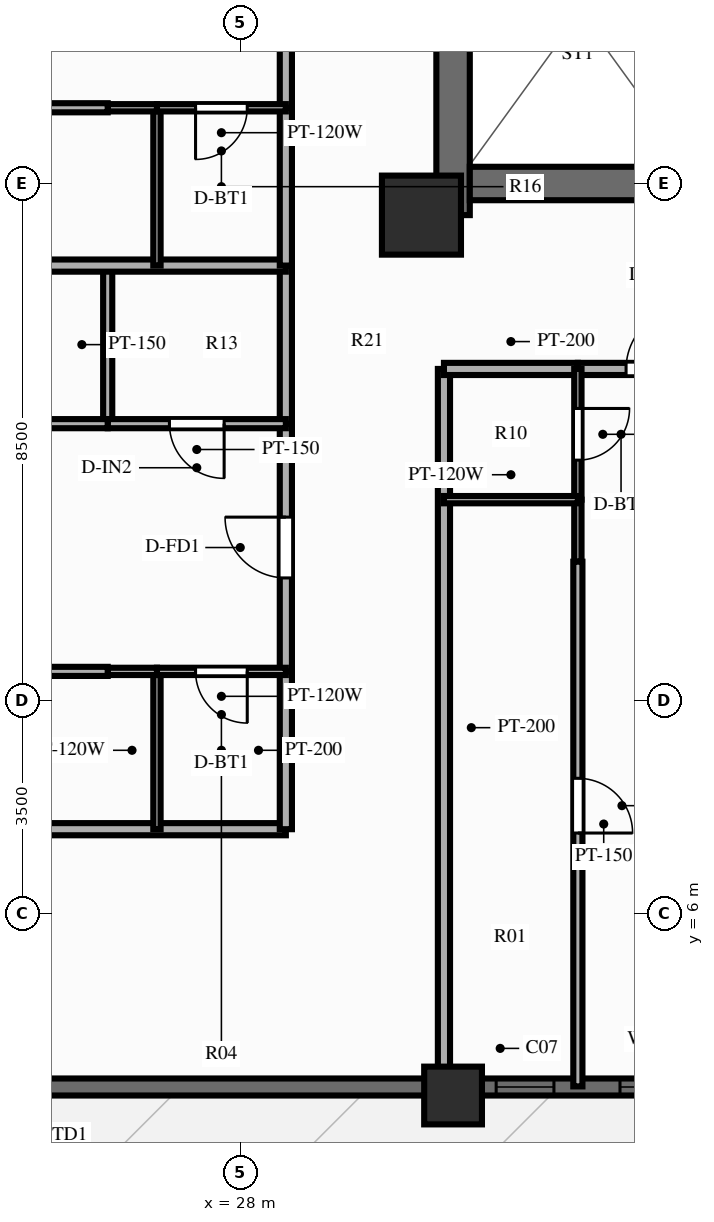
"""IFC4 building model, lengths in metres.
Left out: names, types, materials, properties, quantities, classifications, styles, units other than length and angle.
Written with IfcOpenShell. Run it as: python <this file> out.ifc"""

import sys

from ifc_helpers import new_model, si_unit, direction, frame, frame_2d, origin, origin_2d, place, context, subcontext, project, spatial, rectangle, extrude, source, transform, mapped, element, fill, save


model = new_model("IFC4")
c1 = context("Model", 3, precision=1e-05, world=origin(), true_north=direction((0.0, 1.0)))
c2 = subcontext(c1, "Body", "Model", "MODEL_VIEW")
j1 = project(units=[si_unit("LENGTHUNIT", "METRE"), si_unit("PLANEANGLEUNIT", "RADIAN")], contexts=[c1])
p1 = place(None, origin())
s1 = spatial("IfcSite", under=j1, at=p1, CompositionType="ELEMENT")
p2 = place(p1, origin())
s2 = spatial("IfcBuilding", under=s1, at=p2, CompositionType="ELEMENT")
p3 = place(p2, frame((0.0, 0.0, 110.85)))
s3 = spatial("IfcBuildingStorey", under=s2, at=p3, CompositionType="ELEMENT", Elevation=110.85)
p4 = place(p3, frame((31.5, 17.48, 0.0), z_axis=(0.0, 0.0, 1.0), x_axis=(0.0, 1.0, 0.0)))
e1 = element("IfcWall", 1, at=p4, inside=s3, PredefinedType="SHEAR", context=c2, shape_type="SweptSolid", body=[
    extrude(rectangle(XDim=19.04, YDim=0.55, at=frame_2d((9.52, 0.0))), origin(), (0.0, 0.0, 1.0), 3.0),
])
p5 = place(p4, frame((6.32, 0.0, 0.0)))
e2 = element("IfcOpeningElement", 2, at=p5, cuts=e1, PredefinedType="OPENING", context=c2, shape_type="SweptSolid", body=[
    extrude(rectangle(XDim=1.1, YDim=2.15, at=frame_2d((0.55, 1.075))), frame((0.0, 0.287, 0.0), z_axis=(0.0, -1.0, 0.0), x_axis=(1.0, 0.0, 0.0)), (0.0, 0.0, 1.0), 0.574),
])
p6 = place(p3, frame((31.775, 18.0, 0.0), z_axis=(0.0, 0.0, 1.0), x_axis=(1.0, 0.0, 0.0)))
e3 = element("IfcWall", 3, at=p6, inside=s3, PredefinedType="SHEAR", context=c2, shape_type="SweptSolid", body=[
    extrude(rectangle(XDim=12.45, YDim=0.55, at=frame_2d((6.225, 0.0))), origin(), (0.0, 0.0, 1.0), 3.0),
])
m1 = source(origin(), c2, "Body", "SweptSolid", [
    extrude(rectangle(XDim=1.3, YDim=1.3, at=origin_2d()), origin(), (0.0, 0.0, 1.0), 3.0),
])
p7 = place(p3, frame((30.98, 17.48, 0.0), z_axis=(0.0, 0.0, 1.0), x_axis=(1.0, 0.0, 0.0)))
e4 = element("IfcColumn", 4, at=p7, inside=s3, PredefinedType="COLUMN", context=c2, shape_type="MappedRepresentation", body=[
    mapped(m1, transform((0.0, 0.0, 0.0), scale=1.0)),
])
m2 = source(origin(), c2, "Body", "SweptSolid", [
    extrude(rectangle(XDim=0.95, YDim=0.95, at=origin_2d()), origin(), (0.0, 0.0, 1.0), 3.0),
])
p8 = place(p3, frame((31.5, 3.0, 0.0), z_axis=(0.0, 0.0, 1.0), x_axis=(1.0, 0.0, 0.0)))
e5 = element("IfcColumn", 5, at=p8, inside=s3, PredefinedType="COLUMN", context=c2, shape_type="MappedRepresentation", body=[
    mapped(m2, transform((0.0, 0.0, 0.0), scale=1.0)),
])
p9 = place(p3, frame((16.2, 3.14, 0.0), z_axis=(0.0, 0.0, 1.0), x_axis=(1.0, 0.0, 0.0)))
e6 = element("IfcWall", 6, at=p9, inside=s3, PredefinedType="SOLIDWALL", context=c2, shape_type="SweptSolid", body=[
    extrude(rectangle(XDim=43.6, YDim=0.28, at=frame_2d((21.8, 0.0))), origin(), (0.0, 0.0, 1.0), 2.28),
])
p10 = place(p9, frame((8.2, 0.0, 0.0), z_axis=(0.0, 0.0, 1.0), x_axis=(-1.0, 0.0, 0.0)))
e7 = element("IfcOpeningElement", 7, at=p10, cuts=e6, PredefinedType="OPENING", context=c2, shape_type="SweptSolid", body=[
    extrude(rectangle(XDim=1.1, YDim=2.15, at=frame_2d((0.55, 1.075))), frame((0.0, 0.152, 0.0), z_axis=(0.0, -1.0, 0.0), x_axis=(1.0, 0.0, 0.0)), (0.0, 0.0, 1.0), 0.304),
])
p11 = place(p9, frame((16.009, 0.0, 0.25)))
e8 = element("IfcOpeningElement", 8, at=p11, cuts=e6, PredefinedType="OPENING", context=c2, shape_type="SweptSolid", body=[
    extrude(rectangle(XDim=0.95, YDim=1.5, at=frame_2d((0.475, 0.75))), frame((0.0, 0.152, 0.0), z_axis=(0.0, -1.0, 0.0), x_axis=(1.0, 0.0, 0.0)), (0.0, 0.0, 1.0), 0.304),
])
p12 = place(p9, frame((18.045, 0.0, 0.25)))
e9 = element("IfcOpeningElement", 9, at=p12, cuts=e6, PredefinedType="OPENING", context=c2, shape_type="SweptSolid", body=[
    extrude(rectangle(XDim=1.2, YDim=1.5, at=frame_2d((0.6, 0.75))), frame((0.0, 0.152, 0.0), z_axis=(0.0, -1.0, 0.0), x_axis=(1.0, 0.0, 0.0)), (0.0, 0.0, 1.0), 0.304),
])
p13 = place(p9, frame((20.391, 0.0, 0.25)))
e10 = element("IfcOpeningElement", 10, at=p13, cuts=e6, PredefinedType="OPENING", context=c2, shape_type="SweptSolid", body=[
    extrude(rectangle(XDim=1.2, YDim=1.5, at=frame_2d((0.6, 0.75))), frame((0.0, 0.152, 0.0), z_axis=(0.0, -1.0, 0.0), x_axis=(1.0, 0.0, 0.0)), (0.0, 0.0, 1.0), 0.304),
])
p14 = place(p9, frame((22.519, 0.0, 0.25)))
e11 = element("IfcOpeningElement", 11, at=p14, cuts=e6, PredefinedType="OPENING", context=c2, shape_type="SweptSolid", body=[
    extrude(rectangle(XDim=1.2, YDim=1.5, at=frame_2d((0.6, 0.75))), frame((0.0, 0.152, 0.0), z_axis=(0.0, -1.0, 0.0), x_axis=(1.0, 0.0, 0.0)), (0.0, 0.0, 1.0), 0.304),
])
p15 = place(p9, frame((24.647, 0.0, 0.25)))
e12 = element("IfcOpeningElement", 12, at=p15, cuts=e6, PredefinedType="OPENING", context=c2, shape_type="SweptSolid", body=[
    extrude(rectangle(XDim=1.2, YDim=1.5, at=frame_2d((0.6, 0.75))), frame((0.0, 0.152, 0.0), z_axis=(0.0, -1.0, 0.0), x_axis=(1.0, 0.0, 0.0)), (0.0, 0.0, 1.0), 0.304),
])
p16 = place(p9, frame((26.667, 0.0, 0.25)))
e13 = element("IfcOpeningElement", 13, at=p16, cuts=e6, PredefinedType="OPENING", context=c2, shape_type="SweptSolid", body=[
    extrude(rectangle(XDim=0.95, YDim=1.5, at=frame_2d((0.475, 0.75))), frame((0.0, 0.152, 0.0), z_axis=(0.0, -1.0, 0.0), x_axis=(1.0, 0.0, 0.0)), (0.0, 0.0, 1.0), 0.304),
])
p17 = place(p9, frame((35.35, 0.0, 0.25)))
e14 = element("IfcOpeningElement", 14, at=p17, cuts=e6, PredefinedType="OPENING", context=c2, shape_type="SweptSolid", body=[
    extrude(rectangle(XDim=1.2, YDim=1.5, at=frame_2d((0.6, 0.75))), frame((0.0, 0.152, 0.0), z_axis=(0.0, -1.0, 0.0), x_axis=(1.0, 0.0, 0.0)), (0.0, 0.0, 1.0), 0.304),
])
p18 = place(p3, frame((31.35, 14.95, 0.0), z_axis=(0.0, 0.0, 1.0), x_axis=(0.0, -1.0, 0.0)))
e15 = element("IfcWall", 15, at=p18, inside=s3, PredefinedType="PARTITIONING", context=c2, shape_type="SweptSolid", body=[
    extrude(rectangle(XDim=11.8, YDim=0.2, at=frame_2d((5.9, 0.0))), origin(), (0.0, 0.0, 1.0), 2.34),
])
p19 = place(p3, frame((31.35, 14.95, 0.0), z_axis=(0.0, 0.0, 1.0), x_axis=(1.0, 0.0, 0.0)))
e16 = element("IfcWall", 16, at=p19, inside=s3, PredefinedType="PARTITIONING", context=c2, shape_type="SweptSolid", body=[
    extrude(rectangle(XDim=2.202, YDim=0.2, at=frame_2d((1.101, 0.0))), origin(), (0.0, 0.0, 1.0), 2.79),
])
p20 = place(p3, frame((33.552, 14.95, 0.0), z_axis=(0.0, 0.0, 1.0), x_axis=(1.0, 0.0, 0.0)))
e17 = element("IfcWall", 17, at=p20, inside=s3, PredefinedType="PARTITIONING", context=c2, shape_type="SweptSolid", body=[
    extrude(rectangle(XDim=2.585, YDim=0.2, at=frame_2d((1.293, 0.0))), origin(), (0.0, 0.0, 1.0), 2.79),
])
p21 = place(p20, frame((0.793, 0.0, 0.0)))
e18 = element("IfcOpeningElement", 18, at=p21, cuts=e17, PredefinedType="OPENING", context=c2, shape_type="SweptSolid", body=[
    extrude(rectangle(XDim=1.0, YDim=2.15, at=frame_2d((0.5, 1.075))), frame((0.0, 0.112, 0.0), z_axis=(0.0, -1.0, 0.0), x_axis=(1.0, 0.0, 0.0)), (0.0, 0.0, 1.0), 0.224),
])
p22 = place(p3, frame((33.552, 14.95, 0.0), z_axis=(0.0, 0.0, 1.0), x_axis=(0.0, -1.0, 0.0)))
e19 = element("IfcWall", 19, at=p22, inside=s3, PredefinedType="PARTITIONING", context=c2, shape_type="SweptSolid", body=[
    extrude(rectangle(XDim=2.15, YDim=0.12, at=frame_2d((1.075, 0.0))), origin(), (0.0, 0.0, 1.0), 2.79),
])
p23 = place(p22, frame((0.65, 0.0, 0.0)))
e20 = element("IfcOpeningElement", 20, at=p23, cuts=e19, PredefinedType="OPENING", context=c2, shape_type="SweptSolid", body=[
    extrude(rectangle(XDim=0.85, YDim=2.05, at=frame_2d((0.425, 1.025))), frame((0.0, 0.072, 0.0), z_axis=(0.0, -1.0, 0.0), x_axis=(1.0, 0.0, 0.0)), (0.0, 0.0, 1.0), 0.144),
])
p24 = place(p3, frame((33.552, 12.8, 0.0), z_axis=(0.0, 0.0, 1.0), x_axis=(0.0, -1.0, 0.0)))
e21 = element("IfcWall", 21, at=p24, inside=s3, PredefinedType="PARTITIONING", context=c2, shape_type="SweptSolid", body=[
    extrude(rectangle(XDim=1.02, YDim=0.12, at=frame_2d((0.51, 0.0))), origin(), (0.0, 0.0, 1.0), 2.79),
])
p25 = place(p3, frame((31.35, 12.8, 0.0), z_axis=(0.0, 0.0, 1.0), x_axis=(1.0, 0.0, 0.0)))
e22 = element("IfcWall", 22, at=p25, inside=s3, PredefinedType="PARTITIONING", context=c2, shape_type="SweptSolid", body=[
    extrude(rectangle(XDim=2.202, YDim=0.12, at=frame_2d((1.101, 0.0))), origin(), (0.0, 0.0, 1.0), 2.79),
])
p26 = place(p3, frame((33.552, 11.78, 0.0), z_axis=(0.0, 0.0, 1.0), x_axis=(0.0, -1.0, 0.0)))
e23 = element("IfcWall", 23, at=p26, inside=s3, PredefinedType="PARTITIONING", context=c2, shape_type="SweptSolid", body=[
    extrude(rectangle(XDim=8.63, YDim=0.15, at=frame_2d((4.315, 0.0))), origin(), (0.0, 0.0, 1.0), 2.79),
])
p27 = place(p26, frame((3.563, 0.0, 0.0)))
e24 = element("IfcOpeningElement", 24, at=p27, cuts=e23, PredefinedType="OPENING", context=c2, shape_type="SweptSolid", body=[
    extrude(rectangle(XDim=0.9, YDim=2.1, at=frame_2d((0.45, 1.05))), frame((0.0, 0.087, 0.0), z_axis=(0.0, -1.0, 0.0), x_axis=(1.0, 0.0, 0.0)), (0.0, 0.0, 1.0), 0.174),
])
p28 = place(p3, frame((28.75, 7.38, 0.0), z_axis=(0.0, 0.0, 1.0), x_axis=(-1.0, 0.0, 0.0)))
e25 = element("IfcWall", 25, at=p28, inside=s3, PredefinedType="PARTITIONING", context=c2, shape_type="SweptSolid", body=[
    extrude(rectangle(XDim=16.6, YDim=0.2, at=frame_2d((8.3, 0.0))), origin(), (0.0, 0.0, 1.0), 2.79),
])
p29 = place(p3, frame((28.75, 7.38, 0.0), z_axis=(0.0, 0.0, 1.0), x_axis=(0.0, 1.0, 0.0)))
e26 = element("IfcWall", 26, at=p29, inside=s3, PredefinedType="PARTITIONING", context=c2, shape_type="SweptSolid", body=[
    extrude(rectangle(XDim=2.596, YDim=0.2, at=frame_2d((1.298, 0.0))), origin(), (0.0, 0.0, 1.0), 2.79),
])
p30 = place(p3, frame((28.75, 9.976, 0.0), z_axis=(0.0, 0.0, 1.0), x_axis=(0.0, 1.0, 0.0)))
e27 = element("IfcWall", 27, at=p30, inside=s3, PredefinedType="PARTITIONING", context=c2, shape_type="SweptSolid", body=[
    extrude(rectangle(XDim=4.074, YDim=0.2, at=frame_2d((2.037, 0.0))), origin(), (0.0, 0.0, 1.0), 2.79),
])
p31 = place(p30, frame((1.537, 0.0, 0.0)))
e28 = element("IfcOpeningElement", 28, at=p31, cuts=e27, PredefinedType="OPENING", context=c2, shape_type="SweptSolid", body=[
    extrude(rectangle(XDim=1.0, YDim=2.15, at=frame_2d((0.5, 1.075))), frame((0.0, 0.112, 0.0), z_axis=(0.0, -1.0, 0.0), x_axis=(1.0, 0.0, 0.0)), (0.0, 0.0, 1.0), 0.224),
])
p32 = place(p3, frame((28.75, 14.05, 0.0), z_axis=(0.0, 0.0, 1.0), x_axis=(0.0, 1.0, 0.0)))
e29 = element("IfcWall", 29, at=p32, inside=s3, PredefinedType="PARTITIONING", context=c2, shape_type="SweptSolid", body=[
    extrude(rectangle(XDim=2.6, YDim=0.2, at=frame_2d((1.3, 0.0))), origin(), (0.0, 0.0, 1.0), 2.79),
])
p33 = place(p3, frame((26.63, 7.38, 0.0), z_axis=(0.0, 0.0, 1.0), x_axis=(0.0, 1.0, 0.0)))
e30 = element("IfcWall", 30, at=p33, inside=s3, PredefinedType="PARTITIONING", context=c2, shape_type="SweptSolid", body=[
    extrude(rectangle(XDim=2.596, YDim=0.12, at=frame_2d((1.298, 0.0))), origin(), (0.0, 0.0, 1.0), 2.79),
])
p34 = place(p3, frame((25.82, 14.05, 0.0), z_axis=(0.0, 0.0, 1.0), x_axis=(0.0, 1.0, 0.0)))
e31 = element("IfcWall", 31, at=p34, inside=s3, PredefinedType="PARTITIONING", context=c2, shape_type="SweptSolid", body=[
    extrude(rectangle(XDim=2.6, YDim=0.15, at=frame_2d((1.3, 0.0))), origin(), (0.0, 0.0, 1.0), 2.79),
])
p35 = place(p3, frame((28.75, 9.976, 0.0), z_axis=(0.0, 0.0, 1.0), x_axis=(-1.0, 0.0, 0.0)))
e32 = element("IfcWall", 32, at=p35, inside=s3, PredefinedType="PARTITIONING", context=c2, shape_type="SweptSolid", body=[
    extrude(rectangle(XDim=2.12, YDim=0.12, at=frame_2d((1.06, 0.0))), origin(), (0.0, 0.0, 1.0), 2.79),
])
p36 = place(p35, frame((0.635, 0.0, 0.0)))
e33 = element("IfcOpeningElement", 33, at=p36, cuts=e32, PredefinedType="OPENING", context=c2, shape_type="SweptSolid", body=[
    extrude(rectangle(XDim=0.85, YDim=2.05, at=frame_2d((0.425, 1.025))), frame((0.0, 0.072, 0.0), z_axis=(0.0, -1.0, 0.0), x_axis=(1.0, 0.0, 0.0)), (0.0, 0.0, 1.0), 0.144),
])
p37 = place(p3, frame((26.63, 9.976, 0.0), z_axis=(0.0, 0.0, 1.0), x_axis=(-1.0, 0.0, 0.0)))
e34 = element("IfcWall", 34, at=p37, inside=s3, PredefinedType="PARTITIONING", context=c2, shape_type="SweptSolid", body=[
    extrude(rectangle(XDim=0.81, YDim=0.12, at=frame_2d((0.405, 0.0))), origin(), (0.0, 0.0, 1.0), 2.79),
])
p38 = place(p3, frame((25.82, 9.976, 0.0), z_axis=(0.0, 0.0, 1.0), x_axis=(-1.0, 0.0, 0.0)))
e35 = element("IfcWall", 35, at=p38, inside=s3, PredefinedType="PARTITIONING", context=c2, shape_type="SweptSolid", body=[
    extrude(rectangle(XDim=13.67, YDim=0.15, at=frame_2d((6.835, 0.0))), origin(), (0.0, 0.0, 1.0), 2.79),
])
p39 = place(p38, frame((5.873, 0.0, 0.0)))
e36 = element("IfcOpeningElement", 36, at=p39, cuts=e35, PredefinedType="OPENING", context=c2, shape_type="SweptSolid", body=[
    extrude(rectangle(XDim=0.9, YDim=2.1, at=frame_2d((0.45, 1.05))), frame((0.0, 0.087, 0.0), z_axis=(0.0, -1.0, 0.0), x_axis=(1.0, 0.0, 0.0)), (0.0, 0.0, 1.0), 0.174),
])
p40 = place(p3, frame((28.75, 14.05, 0.0), z_axis=(0.0, 0.0, 1.0), x_axis=(-1.0, 0.0, 0.0)))
e37 = element("IfcWall", 37, at=p40, inside=s3, PredefinedType="PARTITIONING", context=c2, shape_type="SweptSolid", body=[
    extrude(rectangle(XDim=2.93, YDim=0.15, at=frame_2d((1.465, 0.0))), origin(), (0.0, 0.0, 1.0), 2.79),
])
p41 = place(p40, frame((1.015, 0.0, 0.0)))
e38 = element("IfcOpeningElement", 38, at=p41, cuts=e37, PredefinedType="OPENING", context=c2, shape_type="SweptSolid", body=[
    extrude(rectangle(XDim=0.9, YDim=2.1, at=frame_2d((0.45, 1.05))), frame((0.0, 0.087, 0.0), z_axis=(0.0, -1.0, 0.0), x_axis=(1.0, 0.0, 0.0)), (0.0, 0.0, 1.0), 0.174),
])
p42 = place(p3, frame((25.82, 14.05, 0.0), z_axis=(0.0, 0.0, 1.0), x_axis=(-1.0, 0.0, 0.0)))
e39 = element("IfcWall", 39, at=p42, inside=s3, PredefinedType="PARTITIONING", context=c2, shape_type="SweptSolid", body=[
    extrude(rectangle(XDim=13.67, YDim=0.15, at=frame_2d((6.835, 0.0))), origin(), (0.0, 0.0, 1.0), 2.79),
])
p43 = place(p42, frame((5.873, 0.0, 0.0)))
e40 = element("IfcOpeningElement", 40, at=p43, cuts=e39, PredefinedType="OPENING", context=c2, shape_type="SweptSolid", body=[
    extrude(rectangle(XDim=0.9, YDim=2.1, at=frame_2d((0.45, 1.05))), frame((0.0, 0.087, 0.0), z_axis=(0.0, -1.0, 0.0), x_axis=(1.0, 0.0, 0.0)), (0.0, 0.0, 1.0), 0.174),
])
p44 = place(p3, frame((28.75, 16.65, 0.0), z_axis=(0.0, 0.0, 1.0), x_axis=(-1.0, 0.0, 0.0)))
e41 = element("IfcWall", 41, at=p44, inside=s3, PredefinedType="PARTITIONING", context=c2, shape_type="SweptSolid", body=[
    extrude(rectangle(XDim=16.6, YDim=0.2, at=frame_2d((8.3, 0.0))), origin(), (0.0, 0.0, 1.0), 2.79),
])
p45 = place(p3, frame((28.75, 16.65, 0.0), z_axis=(0.0, 0.0, 1.0), x_axis=(0.0, 1.0, 0.0)))
e42 = element("IfcWall", 42, at=p45, inside=s3, PredefinedType="PARTITIONING", context=c2, shape_type="SweptSolid", body=[
    extrude(rectangle(XDim=2.596, YDim=0.2, at=frame_2d((1.298, 0.0))), origin(), (0.0, 0.0, 1.0), 2.79),
])
p46 = place(p3, frame((28.75, 19.246, 0.0), z_axis=(0.0, 0.0, 1.0), x_axis=(0.0, 1.0, 0.0)))
e43 = element("IfcWall", 43, at=p46, inside=s3, PredefinedType="PARTITIONING", context=c2, shape_type="SweptSolid", body=[
    extrude(rectangle(XDim=4.074, YDim=0.2, at=frame_2d((2.037, 0.0))), origin(), (0.0, 0.0, 1.0), 2.79),
])
p47 = place(p46, frame((1.537, 0.0, 0.0)))
e44 = element("IfcOpeningElement", 44, at=p47, cuts=e43, PredefinedType="OPENING", context=c2, shape_type="SweptSolid", body=[
    extrude(rectangle(XDim=1.0, YDim=2.15, at=frame_2d((0.5, 1.075))), frame((0.0, 0.112, 0.0), z_axis=(0.0, -1.0, 0.0), x_axis=(1.0, 0.0, 0.0)), (0.0, 0.0, 1.0), 0.224),
])
p48 = place(p3, frame((26.63, 16.65, 0.0), z_axis=(0.0, 0.0, 1.0), x_axis=(0.0, 1.0, 0.0)))
e45 = element("IfcWall", 45, at=p48, inside=s3, PredefinedType="PARTITIONING", context=c2, shape_type="SweptSolid", body=[
    extrude(rectangle(XDim=2.596, YDim=0.12, at=frame_2d((1.298, 0.0))), origin(), (0.0, 0.0, 1.0), 2.79),
])
p49 = place(p3, frame((28.75, 19.246, 0.0), z_axis=(0.0, 0.0, 1.0), x_axis=(-1.0, 0.0, 0.0)))
e46 = element("IfcWall", 46, at=p49, inside=s3, PredefinedType="PARTITIONING", context=c2, shape_type="SweptSolid", body=[
    extrude(rectangle(XDim=2.12, YDim=0.12, at=frame_2d((1.06, 0.0))), origin(), (0.0, 0.0, 1.0), 2.79),
])
p50 = place(p49, frame((0.635, 0.0, 0.0)))
e47 = element("IfcOpeningElement", 47, at=p50, cuts=e46, PredefinedType="OPENING", context=c2, shape_type="SweptSolid", body=[
    extrude(rectangle(XDim=0.85, YDim=2.05, at=frame_2d((0.425, 1.025))), frame((0.0, 0.072, 0.0), z_axis=(0.0, -1.0, 0.0), x_axis=(1.0, 0.0, 0.0)), (0.0, 0.0, 1.0), 0.144),
])
p51 = place(p3, frame((26.63, 19.246, 0.0), z_axis=(0.0, 0.0, 1.0), x_axis=(-1.0, 0.0, 0.0)))
e48 = element("IfcWall", 48, at=p51, inside=s3, PredefinedType="PARTITIONING", context=c2, shape_type="SweptSolid", body=[
    extrude(rectangle(XDim=0.81, YDim=0.12, at=frame_2d((0.405, 0.0))), origin(), (0.0, 0.0, 1.0), 2.79),
])
p52 = place(p3, frame((25.82, 19.246, 0.0), z_axis=(0.0, 0.0, 1.0), x_axis=(-1.0, 0.0, 0.0)))
e49 = element("IfcWall", 49, at=p52, inside=s3, PredefinedType="PARTITIONING", context=c2, shape_type="SweptSolid", body=[
    extrude(rectangle(XDim=13.67, YDim=0.15, at=frame_2d((6.835, 0.0))), origin(), (0.0, 0.0, 1.0), 2.79),
])
p53 = place(p52, frame((5.873, 0.0, 0.0)))
e50 = element("IfcOpeningElement", 50, at=p53, cuts=e49, PredefinedType="OPENING", context=c2, shape_type="SweptSolid", body=[
    extrude(rectangle(XDim=0.9, YDim=2.1, at=frame_2d((0.45, 1.05))), frame((0.0, 0.087, 0.0), z_axis=(0.0, -1.0, 0.0), x_axis=(1.0, 0.0, 0.0)), (0.0, 0.0, 1.0), 0.174),
])
m3 = source(origin(), c2, "Body", "SweptSolid", [
    extrude(rectangle(XDim=0.95, YDim=1.5, at=frame_2d((0.475, 0.75))), frame((0.0, 0.03, 0.0), z_axis=(0.0, -1.0, 0.0), x_axis=(1.0, 0.0, 0.0)), (0.0, 0.0, 1.0), 0.06),
])
p54 = place(p11, origin())
e51 = element("IfcWindow", 51, at=p54, inside=s3, PartitioningType="SINGLE_PANEL", PredefinedType="WINDOW", context=c2, shape_type="MappedRepresentation", body=[
    mapped(m3, transform((0.0, 0.0, 0.0), scale=1.0)),
])
fill(e8, e51)
m4 = source(origin(), c2, "Body", "SweptSolid", [
    extrude(rectangle(XDim=1.2, YDim=1.5, at=frame_2d((0.6, 0.75))), frame((0.0, 0.03, 0.0), z_axis=(0.0, -1.0, 0.0), x_axis=(1.0, 0.0, 0.0)), (0.0, 0.0, 1.0), 0.06),
])
p55 = place(p12, origin())
e52 = element("IfcWindow", 52, at=p55, inside=s3, PartitioningType="SINGLE_PANEL", PredefinedType="WINDOW", context=c2, shape_type="MappedRepresentation", body=[
    mapped(m4, transform((0.0, 0.0, 0.0), scale=1.0)),
])
fill(e9, e52)
m5 = source(origin(), c2, "Body", "SweptSolid", [
    extrude(rectangle(XDim=1.0, YDim=2.15, at=frame_2d((0.5, 1.075))), frame((0.0, 0.025, 0.0), z_axis=(0.0, -1.0, 0.0), x_axis=(1.0, 0.0, 0.0)), (0.0, 0.0, 1.0), 0.05),
])
p56 = place(p21, origin())
e53 = element("IfcDoor", 53, at=p56, inside=s3, OperationType="SINGLE_SWING_RIGHT", PredefinedType="DOOR", context=c2, shape_type="MappedRepresentation", body=[
    mapped(m5, transform((0.0, 0.0, 0.0), scale=1.0)),
])
fill(e18, e53)
m6 = source(origin(), c2, "Body", "SweptSolid", [
    extrude(rectangle(XDim=0.85, YDim=2.05, at=frame_2d((0.425, 1.025))), frame((0.0, 0.025, 0.0), z_axis=(0.0, -1.0, 0.0), x_axis=(1.0, 0.0, 0.0)), (0.0, 0.0, 1.0), 0.05),
])
p57 = place(p23, origin())
e54 = element("IfcDoor", 54, at=p57, inside=s3, OperationType="SINGLE_SWING_LEFT", PredefinedType="DOOR", context=c2, shape_type="MappedRepresentation", body=[
    mapped(m6, transform((0.0, 0.0, 0.0), scale=1.0)),
])
fill(e20, e54)
m7 = source(origin(), c2, "Body", "SweptSolid", [
    extrude(rectangle(XDim=0.9, YDim=2.1, at=frame_2d((0.45, 1.05))), frame((0.0, 0.025, 0.0), z_axis=(0.0, -1.0, 0.0), x_axis=(1.0, 0.0, 0.0)), (0.0, 0.0, 1.0), 0.05),
])
p58 = place(p27, origin())
e55 = element("IfcDoor", 55, at=p58, inside=s3, OperationType="SINGLE_SWING_RIGHT", PredefinedType="DOOR", context=c2, shape_type="MappedRepresentation", body=[
    mapped(m7, transform((0.0, 0.0, 0.0), scale=1.0)),
])
fill(e24, e55)
p59 = place(p31, origin())
e56 = element("IfcDoor", 56, at=p59, inside=s3, OperationType="SINGLE_SWING_RIGHT", PredefinedType="DOOR", context=c2, shape_type="MappedRepresentation", body=[
    mapped(m5, transform((0.0, 0.0, 0.0), scale=1.0)),
])
fill(e28, e56)
p60 = place(p36, origin())
e57 = element("IfcDoor", 57, at=p60, inside=s3, OperationType="SINGLE_SWING_LEFT", PredefinedType="DOOR", context=c2, shape_type="MappedRepresentation", body=[
    mapped(m6, transform((0.0, 0.0, 0.0), scale=1.0)),
])
fill(e33, e57)
p61 = place(p41, origin())
e58 = element("IfcDoor", 58, at=p61, inside=s3, OperationType="SINGLE_SWING_LEFT", PredefinedType="DOOR", context=c2, shape_type="MappedRepresentation", body=[
    mapped(m7, transform((0.0, 0.0, 0.0), scale=1.0)),
])
fill(e38, e58)
p62 = place(p50, origin())
e59 = element("IfcDoor", 59, at=p62, inside=s3, OperationType="SINGLE_SWING_RIGHT", PredefinedType="DOOR", context=c2, shape_type="MappedRepresentation", body=[
    mapped(m6, transform((0.0, 0.0, 0.0), scale=1.0)),
])
fill(e47, e59)
save(model, sys.argv[1])
